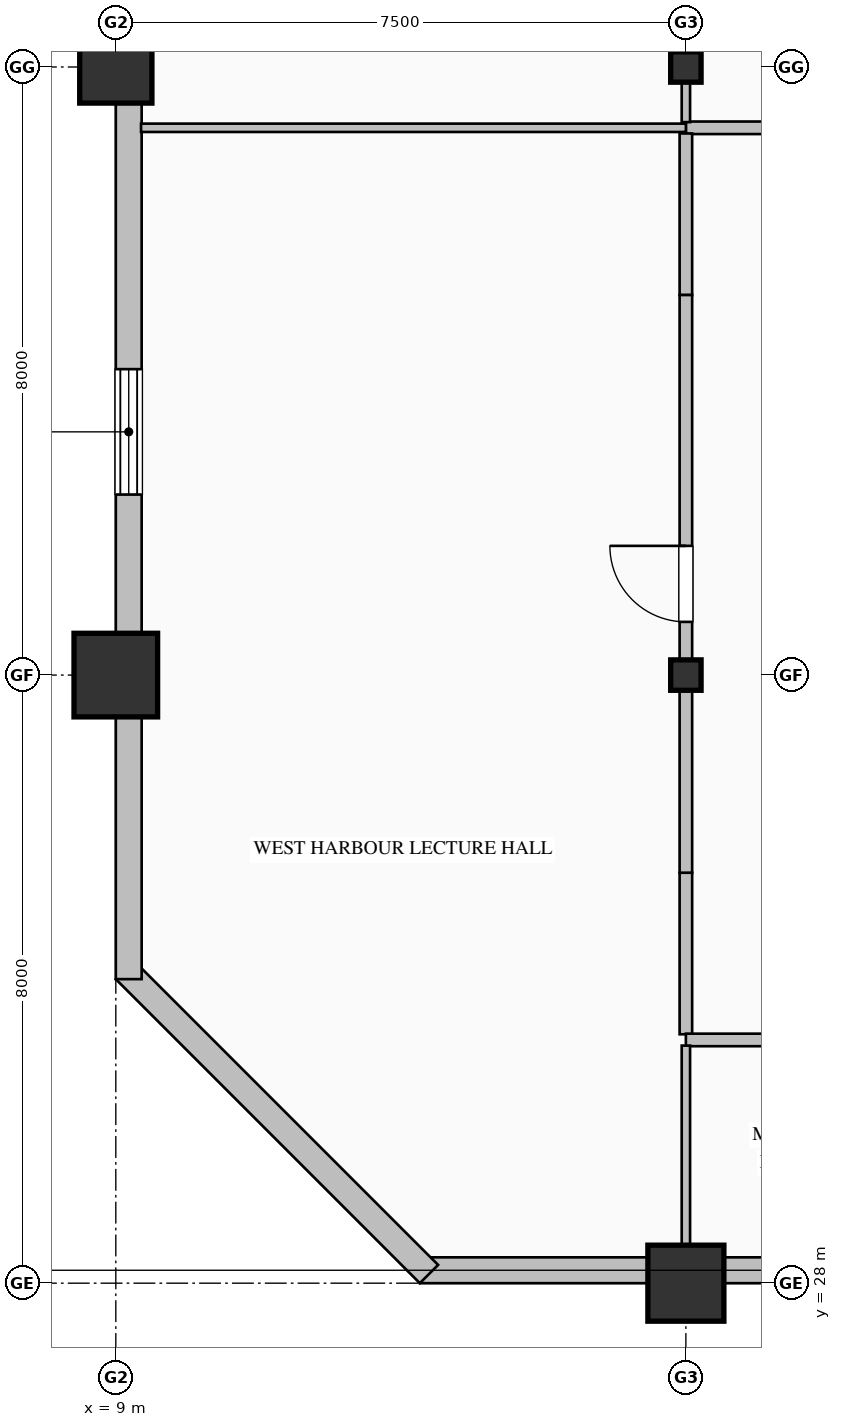
"""IFC4 building model, lengths in metres.
Left out: names, types, materials, properties, quantities, classifications, styles, units other than length and angle.
Written with IfcOpenShell. Run it as: python <this file> out.ifc"""

import sys

from ifc_helpers import new_model, si_unit, direction, frame, frame_2d, origin, origin_2d, place, context, subcontext, project, spatial, rectangle, hollow_rectangle, hollow_circle, i_section, extrude, element, fill, save


model = new_model("IFC4")
c1 = context("Model", 3, precision=1e-05, world=origin(), true_north=direction((0.0, 1.0)))
c2 = subcontext(c1, "Body", "Model", "MODEL_VIEW")
j1 = project(units=[si_unit("LENGTHUNIT", "METRE"), si_unit("PLANEANGLEUNIT", "RADIAN")], contexts=[c1])
p1 = place(None, origin())
s1 = spatial("IfcSite", under=j1, at=p1, CompositionType="ELEMENT")
p2 = place(p1, origin())
s2 = spatial("IfcBuilding", under=s1, at=p2, CompositionType="ELEMENT")
p3 = place(p2, frame((0.0, 0.0, 139.0)))
s3 = spatial("IfcBuildingStorey", under=s2, at=p3, CompositionType="ELEMENT", Elevation=139.0)
p4 = place(p3, frame((9.0, 36.0, 0.0), z_axis=(0.0, 0.0, 1.0), x_axis=(1.0, 0.0, 0.0)))
e1 = element("IfcColumn", 1, at=p4, inside=s3, PredefinedType="COLUMN", context=c2, shape_type="SweptSolid", body=[
    extrude(hollow_rectangle(XDim=1.1, YDim=1.1, WallThickness=0.04, at=origin_2d()), origin(), (0.0, 0.0, 1.0), 4.0),
])
p5 = place(p3, frame((9.0, 44.0, 0.0), z_axis=(0.0, 0.0, 1.0), x_axis=(1.0, 0.0, 0.0)))
e2 = element("IfcColumn", 2, at=p5, inside=s3, PredefinedType="COLUMN", context=c2, shape_type="SweptSolid", body=[
    extrude(hollow_rectangle(XDim=0.95, YDim=0.95, WallThickness=0.036, at=origin_2d()), origin(), (0.0, 0.0, 1.0), 4.0),
])
p6 = place(p3, frame((16.5, 28.0, 0.0), z_axis=(0.0, 0.0, 1.0), x_axis=(1.0, 0.0, 0.0)))
e3 = element("IfcColumn", 3, at=p6, inside=s3, PredefinedType="COLUMN", context=c2, shape_type="SweptSolid", body=[
    extrude(hollow_circle(Radius=0.5, WallThickness=0.036, at=origin_2d()), origin(), (0.0, 0.0, 1.0), 4.0),
])
for number, where, z_axis, x_axis in (
    (4, (16.5, 36.0, 0.0), (0.0, 0.0, 1.0), (1.0, 0.0, 0.0)),
    (5, (16.5, 44.0, 0.0), (0.0, 0.0, 1.0), (1.0, 0.0, 0.0)),
):
    element("IfcColumn", number, at=place(p3, frame(where, z_axis=z_axis, x_axis=x_axis)), inside=s3, PredefinedType="COLUMN", context=c2, shape_type="SweptSolid", body=[
        extrude(i_section(OverallWidth=0.4, OverallDepth=0.4, WebThickness=0.013, FlangeThickness=0.021, FilletRadius=0.022, at=origin_2d()), origin(), (0.0, 0.0, 1.0), 4.0),
    ])
p7 = place(p3, frame((40.52, 28.17, 0.0), z_axis=(0.0, 0.0, 1.0), x_axis=(-1.0, 0.0, 0.0)))
e6 = element("IfcWall", 6, at=p7, inside=s3, PredefinedType="SOLIDWALL", context=c2, shape_type="SweptSolid", body=[
    extrude(rectangle(XDim=27.52, YDim=0.34, at=frame_2d((13.76, 0.0))), origin(), (0.0, 0.0, 1.0), 3.165),
])
p8 = place(p7, frame((10.05, 0.0, 0.85)))
e7 = element("IfcOpeningElement", 7, at=p8, cuts=e6, PredefinedType="OPENING", context=c2, shape_type="SweptSolid", body=[
    extrude(rectangle(XDim=1.5, YDim=1.95, at=frame_2d((0.75, 0.975))), frame((0.0, 0.18, 0.0), z_axis=(0.0, -1.0, 0.0), x_axis=(1.0, 0.0, 0.0)), (0.0, 0.0, 1.0), 0.36),
])
p9 = place(p7, frame((17.4, 0.0, 0.7)))
e8 = element("IfcOpeningElement", 8, at=p9, cuts=e6, PredefinedType="OPENING", context=c2, shape_type="SweptSolid", body=[
    extrude(rectangle(XDim=1.2, YDim=1.85, at=frame_2d((0.6, 0.925))), frame((0.0, 0.18, 0.0), z_axis=(0.0, -1.0, 0.0), x_axis=(1.0, 0.0, 0.0)), (0.0, 0.0, 1.0), 0.36),
])
p10 = place(p7, frame((20.85, 0.0, 0.85)))
e9 = element("IfcOpeningElement", 9, at=p10, cuts=e6, PredefinedType="OPENING", context=c2, shape_type="SweptSolid", body=[
    extrude(rectangle(XDim=1.5, YDim=1.95, at=frame_2d((0.75, 0.975))), frame((0.0, 0.18, 0.0), z_axis=(0.0, -1.0, 0.0), x_axis=(1.0, 0.0, 0.0)), (0.0, 0.0, 1.0), 0.36),
])
p11 = place(p3, frame((13.12, 28.12, 0.0), z_axis=(0.0, 0.0, 1.0), x_axis=(-0.707106781187, 0.707106781187, 0.0)))
e10 = element("IfcWall", 10, at=p11, inside=s3, PredefinedType="SOLIDWALL", context=c2, shape_type="SweptSolid", body=[
    extrude(rectangle(XDim=5.657, YDim=0.34, at=frame_2d((2.828, 0.0))), origin(), (0.0, 0.0, 1.0), 3.765),
])
p12 = place(p3, frame((9.17, 32.0, 0.0), z_axis=(0.0, 0.0, 1.0), x_axis=(0.0, 1.0, 0.0)))
e11 = element("IfcWall", 11, at=p12, inside=s3, PredefinedType="SOLIDWALL", context=c2, shape_type="SweptSolid", body=[
    extrude(rectangle(XDim=16.0, YDim=0.34, at=frame_2d((8.0, 0.0))), origin(), (0.0, 0.0, 1.0), 3.265),
])
p13 = place(p12, frame((6.375, 0.0, 0.85)))
e12 = element("IfcOpeningElement", 12, at=p13, cuts=e11, PredefinedType="OPENING", context=c2, shape_type="SweptSolid", body=[
    extrude(rectangle(XDim=1.65, YDim=1.95, at=frame_2d((0.825, 0.975))), frame((0.0, 0.18, 0.0), z_axis=(0.0, -1.0, 0.0), x_axis=(1.0, 0.0, 0.0)), (0.0, 0.0, 1.0), 0.36),
])
p14 = place(p3, frame((16.5, 31.274, 0.0), z_axis=(0.0, 0.0, 1.0), x_axis=(0.0, 1.0, 0.0)))
e13 = element("IfcWall", 13, at=p14, inside=s3, PredefinedType="PARTITIONING", context=c2, shape_type="SweptSolid", body=[
    extrude(rectangle(XDim=2.125, YDim=0.165, at=frame_2d((1.063, 0.0))), origin(), (0.0, 0.0, 1.0), 3.157),
])
p15 = place(p3, frame((27.0, 31.2, 0.0), z_axis=(0.0, 0.0, 1.0), x_axis=(-1.0, 0.0, 0.0)))
e14 = element("IfcWall", 14, at=p15, inside=s3, PredefinedType="PARTITIONING", context=c2, shape_type="SweptSolid", body=[
    extrude(rectangle(XDim=10.5, YDim=0.165, at=frame_2d((5.25, 0.0))), origin(), (0.0, 0.0, 1.0), 3.765),
])
p16 = place(p15, frame((4.7, 0.0, 0.0)))
e15 = element("IfcOpeningElement", 15, at=p16, cuts=e14, PredefinedType="OPENING", context=c2, shape_type="SweptSolid", body=[
    extrude(rectangle(XDim=1.1, YDim=2.2, at=frame_2d((0.55, 1.1))), frame((0.0, 0.093, 0.0), z_axis=(0.0, -1.0, 0.0), x_axis=(1.0, 0.0, 0.0)), (0.0, 0.0, 1.0), 0.185),
])
p17 = place(p3, frame((16.5, 43.2, 0.0), z_axis=(0.0, 0.0, 1.0), x_axis=(1.0, 0.0, 0.0)))
e16 = element("IfcWall", 16, at=p17, inside=s3, PredefinedType="PARTITIONING", context=c2, shape_type="SweptSolid", body=[
    extrude(rectangle(XDim=8.0, YDim=0.165, at=frame_2d((4.0, 0.0))), origin(), (0.0, 0.0, 1.0), 3.765),
])
p18 = place(p17, frame((3.45, 0.0, 0.0)))
e17 = element("IfcOpeningElement", 17, at=p18, cuts=e16, PredefinedType="OPENING", context=c2, shape_type="SweptSolid", body=[
    extrude(rectangle(XDim=1.1, YDim=2.2, at=frame_2d((0.55, 1.1))), frame((0.0, 0.093, 0.0), z_axis=(0.0, -1.0, 0.0), x_axis=(1.0, 0.0, 0.0)), (0.0, 0.0, 1.0), 0.185),
])
p19 = place(p3, frame((16.5, 41.0, 0.0), z_axis=(0.0, 0.0, 1.0), x_axis=(0.0, 1.0, 0.0)))
e18 = element("IfcWall", 18, at=p19, inside=s3, PredefinedType="PARTITIONING", context=c2, shape_type="SweptSolid", body=[
    extrude(rectangle(XDim=2.125, YDim=0.165, at=frame_2d((1.063, 0.0))), origin(), (0.0, 0.0, 1.0), 3.157),
])
p20 = place(p3, frame((16.5, 33.4, 0.0), z_axis=(0.0, 0.0, 1.0), x_axis=(0.0, 1.0, 0.0)))
e19 = element("IfcWall", 19, at=p20, inside=s3, PredefinedType="PARTITIONING", context=c2, shape_type="SweptSolid", body=[
    extrude(rectangle(XDim=7.6, YDim=0.165, at=frame_2d((3.8, 0.0))), origin(), (0.0, 0.0, 1.0), 3.157),
])
p21 = place(p20, frame((3.3, 0.0, 0.0)))
e20 = element("IfcOpeningElement", 20, at=p21, cuts=e19, PredefinedType="OPENING", context=c2, shape_type="SweptSolid", body=[
    extrude(rectangle(XDim=1.0, YDim=2.15, at=frame_2d((0.5, 1.075))), frame((0.0, 0.093, 0.0), z_axis=(0.0, -1.0, 0.0), x_axis=(1.0, 0.0, 0.0)), (0.0, 0.0, 1.0), 0.185),
])
p22 = place(p3, frame((16.5, 51.668, 0.0), z_axis=(0.0, 0.0, 1.0), x_axis=(0.0, -1.0, 0.0)))
e21 = element("IfcWall", 21, at=p22, inside=s3, PredefinedType="MOVABLE", context=c2, shape_type="SweptSolid", body=[
    extrude(rectangle(XDim=8.394, YDim=0.11, at=frame_2d((4.197, 0.0))), origin(), (0.0, 0.0, 1.0), 3.157),
])
p23 = place(p22, frame((3.647, 0.0, 0.0)))
e22 = element("IfcOpeningElement", 22, at=p23, cuts=e21, PredefinedType="OPENING", context=c2, shape_type="SweptSolid", body=[
    extrude(rectangle(XDim=1.1, YDim=2.2, at=frame_2d((0.55, 1.1))), frame((0.0, 0.065, 0.0), z_axis=(0.0, -1.0, 0.0), x_axis=(1.0, 0.0, 0.0)), (0.0, 0.0, 1.0), 0.13),
])
p24 = place(p3, frame((16.5, 43.2, 0.0), z_axis=(0.0, 0.0, 1.0), x_axis=(-1.0, 0.0, 0.0)))
e23 = element("IfcWall", 23, at=p24, inside=s3, PredefinedType="MOVABLE", context=c2, shape_type="SweptSolid", body=[
    extrude(rectangle(XDim=7.168, YDim=0.11, at=frame_2d((3.584, 0.0))), origin(), (0.0, 0.0, 1.0), 3.765),
])
p25 = place(p3, frame((16.5, 31.125, 0.0), z_axis=(0.0, 0.0, 1.0), x_axis=(0.0, -1.0, 0.0)))
e24 = element("IfcWall", 24, at=p25, inside=s3, PredefinedType="MOVABLE", context=c2, shape_type="SweptSolid", body=[
    extrude(rectangle(XDim=2.793, YDim=0.11, at=frame_2d((1.397, 0.0))), origin(), (0.0, 0.0, 1.0), 3.157),
])
p26 = place(p13, origin())
e25 = element("IfcWindow", 25, at=p26, inside=s3, PartitioningType="DOUBLE_PANEL_VERTICAL", PredefinedType="WINDOW", context=c2, shape_type="SweptSolid", body=[
    extrude(rectangle(XDim=1.65, YDim=1.95, at=frame_2d((0.825, 0.975))), frame((0.0, 0.15, 0.0), z_axis=(0.0, -1.0, 0.0), x_axis=(1.0, 0.0, 0.0)), (0.0, 0.0, 1.0), 0.06),
])
fill(e12, e25)
p27 = place(p21, origin())
e26 = element("IfcDoor", 26, at=p27, inside=s3, OperationType="SINGLE_SWING_RIGHT", PredefinedType="DOOR", context=c2, shape_type="SweptSolid", body=[
    extrude(rectangle(XDim=1.0, YDim=2.15, at=frame_2d((0.5, 1.075))), frame((0.0, 0.025, 0.0), z_axis=(0.0, -1.0, 0.0), x_axis=(1.0, 0.0, 0.0)), (0.0, 0.0, 1.0), 0.05),
])
fill(e20, e26)
save(model, sys.argv[1])
